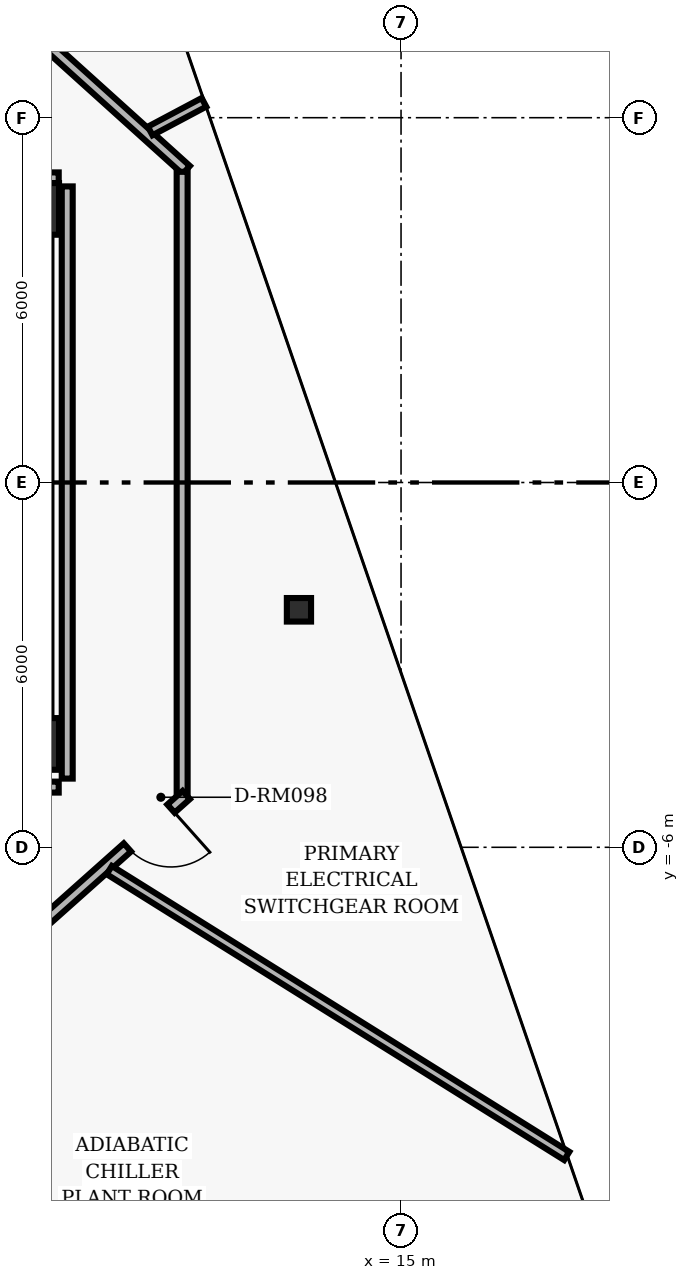
"""IFC4 building model, lengths in metres.
Left out: names, types, materials, properties, quantities, classifications, styles, units other than length and angle.
Written with IfcOpenShell. Run it as: python <this file> out.ifc"""

import sys

from ifc_helpers import new_model, si_unit, direction, frame, frame_2d, origin, origin_2d, place, context, subcontext, project, spatial, rectangle, hollow_rectangle, i_section, extrude, element, fill, save


model = new_model("IFC4")
c1 = context("Model", 3, precision=1e-05, world=origin(), true_north=direction((0.0, 1.0)))
c2 = subcontext(c1, "Body", "Model", "MODEL_VIEW")
j1 = project(units=[si_unit("LENGTHUNIT", "METRE"), si_unit("PLANEANGLEUNIT", "RADIAN")], contexts=[c1])
p1 = place(None, origin())
s1 = spatial("IfcSite", under=j1, at=p1, CompositionType="ELEMENT")
p2 = place(p1, origin())
s2 = spatial("IfcBuilding", under=s1, at=p2, CompositionType="ELEMENT")
p3 = place(p2, frame((0.0, 0.0, 171.52)))
s3 = spatial("IfcBuildingStorey", under=s2, at=p3, CompositionType="ELEMENT", Elevation=171.52)
for number, where, z_axis, x_axis in (
    (1, (8.95, 4.5, 0.0), (0.0, 0.0, 1.0), (1.0, 0.0, 0.0)),
    (2, (8.95, -4.3, 0.0), (0.0, 0.0, 1.0), (1.0, 0.0, 0.0)),
):
    element("IfcColumn", number, at=place(p3, frame(where, z_axis=z_axis, x_axis=x_axis)), inside=s3, PredefinedType="COLUMN", context=c2, shape_type="SweptSolid", body=[
        extrude(hollow_rectangle(XDim=0.85, YDim=0.85, WallThickness=0.055, InnerFilletRadius=0.02, OuterFilletRadius=0.04, at=origin_2d()), origin(), (0.0, 0.0, 1.0), 3.84),
    ])
p4 = place(p3, frame((13.321, -2.094, 0.0), z_axis=(0.0, 0.0, 1.0), x_axis=(1.0, 0.0, 0.0)))
e3 = element("IfcColumn", 3, at=p4, inside=s3, PredefinedType="COLUMN", context=c2, shape_type="SweptSolid", body=[
    extrude(i_section(OverallWidth=0.398, OverallDepth=0.387, WebThickness=0.021, FlangeThickness=0.033, FilletRadius=0.018, at=origin_2d()), origin(), (0.0, 0.0, 1.0), 3.84),
])
p5 = place(p3, frame((6.867, 9.29, 0.0), z_axis=(0.0, 0.0, 1.0), x_axis=(0.742486327971, -0.669861219042, 0.0)))
e4 = element("IfcWall", 4, at=p5, inside=s3, PredefinedType="PARTITIONING", context=c2, shape_type="SweptSolid", body=[
    extrude(rectangle(XDim=6.196, YDim=0.18, at=frame_2d((3.098, 0.0))), origin(), (0.0, 0.0, 1.0), 3.393),
])
p6 = place(p3, frame((11.4, 5.11, 0.0), z_axis=(0.0, 0.0, 1.0), x_axis=(0.0, -1.0, 0.0)))
e5 = element("IfcWall", 5, at=p6, inside=s3, PredefinedType="PARTITIONING", context=c2, shape_type="SweptSolid", body=[
    extrude(rectangle(XDim=10.22, YDim=0.18, at=frame_2d((5.11, 0.0))), origin(), (0.0, 0.0, 1.0), 2.907),
])
p7 = place(p3, frame((11.467, -5.14, 0.0), z_axis=(0.0, 0.0, 1.0), x_axis=(-0.746516597114, -0.665366793756, 0.0)))
e6 = element("IfcWall", 6, at=p7, inside=s3, PredefinedType="PARTITIONING", context=c2, shape_type="SweptSolid", body=[
    extrude(rectangle(XDim=6.342, YDim=0.18, at=frame_2d((3.171, 0.0))), origin(), (0.0, 0.0, 1.0), 3.393),
])
p8 = place(p7, frame((0.336, 0.0, 0.0)))
e7 = element("IfcOpeningElement", 7, at=p8, cuts=e6, PredefinedType="OPENING", context=c2, shape_type="SweptSolid", body=[
    extrude(rectangle(XDim=0.96, YDim=2.02, at=frame_2d((0.48, 1.01))), frame((0.0, 0.1, 0.0), z_axis=(0.0, -1.0, 0.0), x_axis=(1.0, 0.0, 0.0)), (0.0, 0.0, 1.0), 0.2),
])
p9 = place(p3, frame((6.03, -5.01, 0.0), z_axis=(0.0, 0.0, 1.0), x_axis=(1.0, 0.0, 0.0)))
e8 = element("IfcWall", 8, at=p9, inside=s3, PredefinedType="PARTITIONING", context=c2, shape_type="SweptSolid", body=[
    extrude(rectangle(XDim=3.34, YDim=0.18, at=frame_2d((1.67, 0.0))), origin(), (0.0, 0.0, 1.0), 3.393),
])
p10 = place(p3, frame((9.51, -4.87, 0.0), z_axis=(0.0, 0.0, 1.0), x_axis=(0.0, 1.0, 0.0)))
e9 = element("IfcWall", 9, at=p10, inside=s3, PredefinedType="PARTITIONING", context=c2, shape_type="SweptSolid", body=[
    extrude(rectangle(XDim=9.74, YDim=0.18, at=frame_2d((4.87, 0.0))), origin(), (0.0, 0.0, 1.0), 2.907),
])
p11 = place(p3, frame((9.37, 5.01, 0.0), z_axis=(0.0, 0.0, 1.0), x_axis=(-1.0, 0.0, 0.0)))
e10 = element("IfcWall", 10, at=p11, inside=s3, PredefinedType="PARTITIONING", context=c2, shape_type="SweptSolid", body=[
    extrude(rectangle(XDim=2.808, YDim=0.18, at=frame_2d((1.404, 0.0))), origin(), (0.0, 0.0, 1.0), 3.393),
])
p12 = place(p3, frame((10.202, -6.375, 0.0), z_axis=(0.0, 0.0, 1.0), x_axis=(0.848060141207, -0.529899987635, 0.0)))
e11 = element("IfcWall", 11, at=p12, inside=s3, PredefinedType="PARTITIONING", context=c2, shape_type="SweptSolid", body=[
    extrude(rectangle(XDim=8.871, YDim=0.16, at=frame_2d((4.436, 0.0))), origin(), (0.0, 0.0, 1.0), 3.393),
])
p13 = place(p3, frame((10.874, 5.782, 0.0), z_axis=(0.0, 0.0, 1.0), x_axis=(0.882986309888, 0.4693987394, 0.0)))
e12 = element("IfcWall", 12, at=p13, inside=s3, PredefinedType="PARTITIONING", context=c2, shape_type="SweptSolid", body=[
    extrude(rectangle(XDim=1.002, YDim=0.16, at=frame_2d((0.501, 0.0))), origin(), (0.0, 0.0, 1.0), 3.393),
])
p14 = place(p8, origin())
e13 = element("IfcDoor", 13, at=p14, inside=s3, OperationType="SINGLE_SWING_LEFT", PredefinedType="DOOR", context=c2, shape_type="SweptSolid", body=[
    extrude(rectangle(XDim=0.96, YDim=2.02, at=frame_2d((0.48, 1.01))), frame((0.0, 0.025, 0.0), z_axis=(0.0, -1.0, 0.0), x_axis=(1.0, 0.0, 0.0)), (0.0, 0.0, 1.0), 0.05),
])
fill(e7, e13)
save(model, sys.argv[1])
